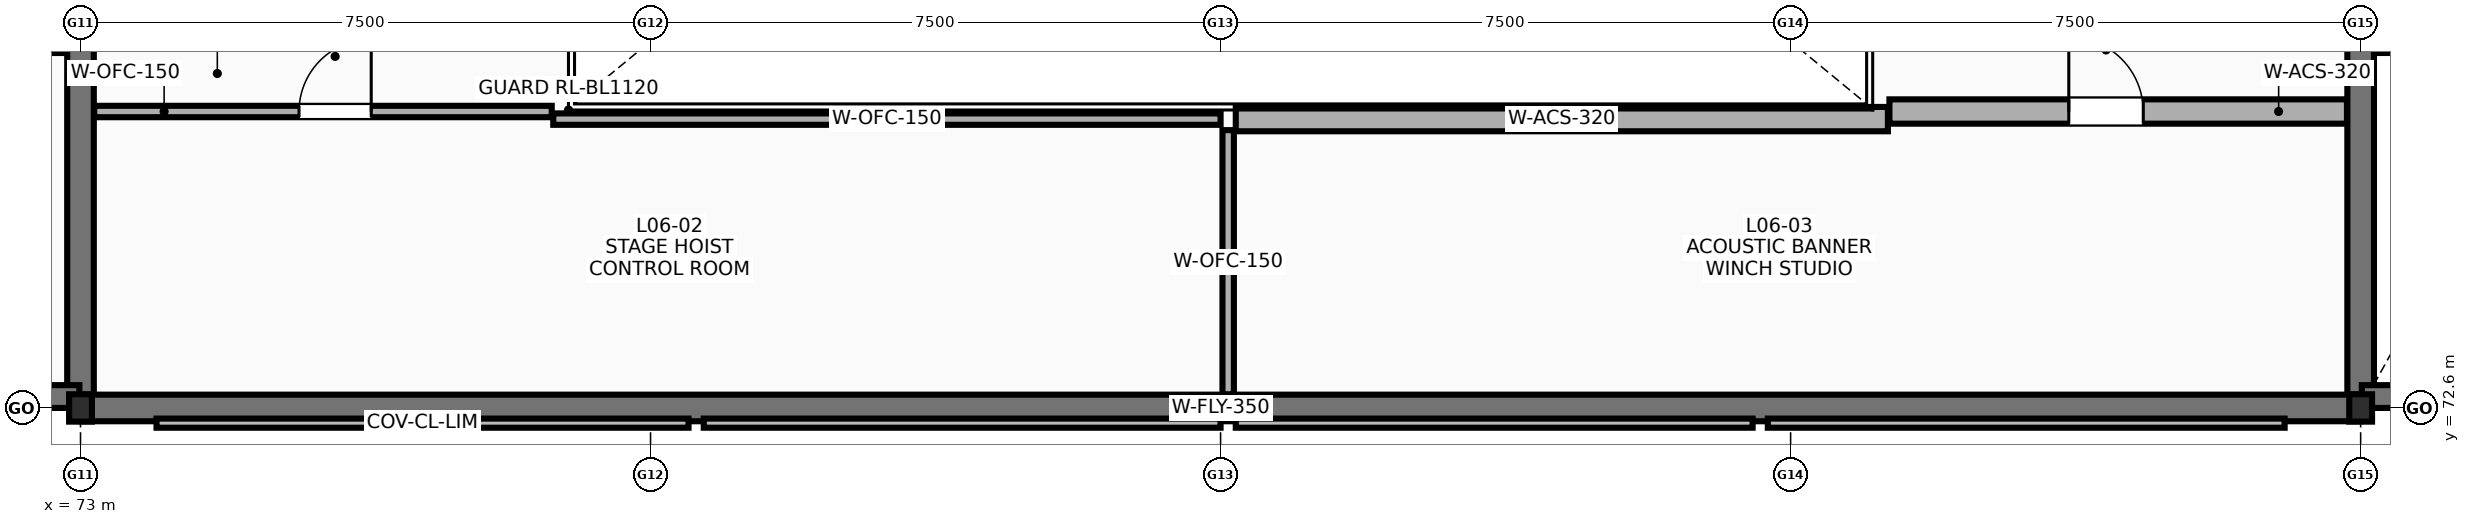
"""IFC4 building model, lengths in metres.
Left out: names, types, materials, properties, quantities, classifications, styles, units other than length and angle.
Written with IfcOpenShell. Run it as: python <this file> out.ifc"""

import sys

from ifc_helpers import new_model, si_unit, direction, frame, frame_2d, origin, origin_2d, place, context, subcontext, project, spatial, rectangle, i_section, extrude, element, fill, save


model = new_model("IFC4")
c1 = context("Model", 3, precision=1e-05, world=origin(), true_north=direction((0.0, 1.0)))
c2 = subcontext(c1, "Body", "Model", "MODEL_VIEW")
j1 = project(units=[si_unit("LENGTHUNIT", "METRE"), si_unit("PLANEANGLEUNIT", "RADIAN")], contexts=[c1])
p1 = place(None, origin())
s1 = spatial("IfcSite", under=j1, at=p1, CompositionType="ELEMENT")
p2 = place(p1, origin())
s2 = spatial("IfcBuilding", under=s1, at=p2, CompositionType="ELEMENT")
p3 = place(p2, frame((0.0, 0.0, 28.2)))
s3 = spatial("IfcBuildingStorey", under=s2, at=p3, CompositionType="ELEMENT", Elevation=28.2)
for number, where, z_axis, x_axis in (
    (1, (73.0, 72.6, 0.0), (0.0, 0.0, 1.0), (1.0, 0.0, 0.0)),
    (2, (103.0, 72.6, 0.0), (0.0, 0.0, 1.0), (1.0, 0.0, 0.0)),
):
    element("IfcColumn", number, at=place(p3, frame(where, z_axis=z_axis, x_axis=x_axis)), inside=s3, PredefinedType="COLUMN", context=c2, shape_type="SweptSolid", body=[
        extrude(i_section(OverallWidth=0.3, OverallDepth=0.36, WebThickness=0.012, FlangeThickness=0.022, FilletRadius=0.027, at=origin_2d()), origin(), (0.0, 0.0, 1.0), 2.8),
    ])
p4 = place(p3, frame((73.0, 72.77, 0.0), z_axis=(0.0, 0.0, 1.0), x_axis=(0.0, 1.0, 0.0)))
e3 = element("IfcWall", 3, at=p4, inside=s3, PredefinedType="SHEAR", context=c2, shape_type="SweptSolid", body=[
    extrude(rectangle(XDim=25.66, YDim=0.35, at=frame_2d((12.83, 0.0))), origin(), (0.0, 0.0, 1.0), 2.8),
])
p5 = place(p4, frame((11.33, 0.0, 0.0), z_axis=(0.0, 0.0, 1.0), x_axis=(-1.0, 0.0, 0.0)))
e4 = element("IfcOpeningElement", 4, at=p5, cuts=e3, PredefinedType="OPENING", context=c2, shape_type="SweptSolid", body=[
    extrude(rectangle(XDim=1.2, YDim=2.15, at=frame_2d((0.6, 1.075))), frame((0.0, 0.185, 0.0), z_axis=(0.0, -1.0, 0.0), x_axis=(1.0, 0.0, 0.0)), (0.0, 0.0, 1.0), 0.37),
])
p6 = place(p3, frame((103.0, 72.77, 0.0), z_axis=(0.0, 0.0, 1.0), x_axis=(0.0, 1.0, 0.0)))
e5 = element("IfcWall", 5, at=p6, inside=s3, PredefinedType="SHEAR", context=c2, shape_type="SweptSolid", body=[
    extrude(rectangle(XDim=25.66, YDim=0.35, at=frame_2d((12.83, 0.0))), origin(), (0.0, 0.0, 1.0), 2.8),
])
p7 = place(p6, frame((10.13, 0.0, 0.0)))
e6 = element("IfcOpeningElement", 6, at=p7, cuts=e5, PredefinedType="OPENING", context=c2, shape_type="SweptSolid", body=[
    extrude(rectangle(XDim=1.2, YDim=2.15, at=frame_2d((0.6, 1.075))), frame((0.0, 0.185, 0.0), z_axis=(0.0, -1.0, 0.0), x_axis=(1.0, 0.0, 0.0)), (0.0, 0.0, 1.0), 0.37),
])
p8 = place(p3, frame((73.005, 72.6, 0.0), z_axis=(0.0, 0.0, 1.0), x_axis=(1.0, 0.0, 0.0)))
e7 = element("IfcWall", 7, at=p8, inside=s3, PredefinedType="SHEAR", context=c2, shape_type="SweptSolid", body=[
    extrude(rectangle(XDim=29.99, YDim=0.35, at=frame_2d((14.995, 0.0))), origin(), (0.0, 0.0, 1.0), 2.8),
])
for number, where, z_axis, x_axis in (
    (8, (69.7, 77.38, 0.0), (0.0, 0.0, 1.0), (1.0, 0.0, 0.0)),
    (9, (103.18, 77.38, 0.0), (0.0, 0.0, 1.0), (1.0, 0.0, 0.0)),
):
    element("IfcWall", number, at=place(p3, frame(where, z_axis=z_axis, x_axis=x_axis)), inside=s3, PredefinedType="SOLIDWALL", context=c2, shape_type="SweptSolid", body=[
        extrude(rectangle(XDim=3.12, YDim=0.22, at=frame_2d((1.56, 0.0))), origin(), (0.0, 0.0, 1.0), 2.8),
    ])
p9 = place(p3, frame((88.1, 72.78, 0.0), z_axis=(0.0, 0.0, 1.0), x_axis=(0.0, 1.0, 0.0)))
e10 = element("IfcWall", 10, at=p9, inside=s3, PredefinedType="PARTITIONING", context=c2, shape_type="SweptSolid", body=[
    extrude(rectangle(XDim=3.475, YDim=0.15, at=frame_2d((1.737, 0.0))), origin(), (0.0, 0.0, 1.0), 2.5),
])
p10 = place(p3, frame((73.18, 76.5, 0.0), z_axis=(0.0, 0.0, 1.0), x_axis=(1.0, 0.0, 0.0)))
e11 = element("IfcWall", 11, at=p10, inside=s3, PredefinedType="PARTITIONING", context=c2, shape_type="SweptSolid", body=[
    extrude(rectangle(XDim=6.02, YDim=0.15, at=frame_2d((3.01, 0.0))), origin(), (0.0, 0.0, 1.0), 2.5),
])
p11 = place(p10, frame((2.695, 0.0, 0.0)))
e12 = element("IfcOpeningElement", 12, at=p11, cuts=e11, PredefinedType="OPENING", context=c2, shape_type="SweptSolid", body=[
    extrude(rectangle(XDim=0.95, YDim=2.15, at=frame_2d((0.475, 1.075))), frame((0.0, 0.085, 0.0), z_axis=(0.0, -1.0, 0.0), x_axis=(1.0, 0.0, 0.0)), (0.0, 0.0, 1.0), 0.17),
])
p12 = place(p3, frame((96.8, 76.5, 0.0), z_axis=(0.0, 0.0, 1.0), x_axis=(1.0, 0.0, 0.0)))
e13 = element("IfcWall", 13, at=p12, inside=s3, PredefinedType="PARTITIONING", context=c2, shape_type="SweptSolid", body=[
    extrude(rectangle(XDim=6.02, YDim=0.32, at=frame_2d((3.01, 0.0))), origin(), (0.0, 0.0, 1.0), 2.5),
])
p13 = place(p12, frame((2.36, 0.0, 0.0)))
e14 = element("IfcOpeningElement", 14, at=p13, cuts=e13, PredefinedType="OPENING", context=c2, shape_type="SweptSolid", body=[
    extrude(rectangle(XDim=0.98, YDim=2.15, at=frame_2d((0.49, 1.075))), frame((0.0, 0.17, 0.0), z_axis=(0.0, -1.0, 0.0), x_axis=(1.0, 0.0, 0.0)), (0.0, 0.0, 1.0), 0.34),
])
for number, where, z_axis, x_axis in (
    (15, (65.5, 72.75, 0.0), (0.0, 0.0, 1.0), (1.0, 0.0, 0.0)),
    (16, (103.015, 72.75, 0.0), (0.0, 0.0, 1.0), (1.0, 0.0, 0.0)),
):
    element("IfcWall", number, at=place(p3, frame(where, z_axis=z_axis, x_axis=x_axis)), inside=s3, PredefinedType="SHEAR", context=c2, shape_type="SweptSolid", body=[
        extrude(rectangle(XDim=7.485, YDim=0.3, at=frame_2d((3.743, 0.0))), origin(), (0.0, 0.0, 1.0), 2.8),
    ])
p14 = place(p3, frame((79.22, 76.4, 0.0), z_axis=(0.0, 0.0, 1.0), x_axis=(1.0, 0.0, 0.0)))
e17 = element("IfcWall", 17, at=p14, inside=s3, PredefinedType="PARTITIONING", context=c2, shape_type="SweptSolid", body=[
    extrude(rectangle(XDim=8.78, YDim=0.15, at=frame_2d((4.39, 0.0))), origin(), (0.0, 0.0, 1.0), 2.5),
])
p15 = place(p3, frame((88.2, 76.4, 0.0), z_axis=(0.0, 0.0, 1.0), x_axis=(1.0, 0.0, 0.0)))
e18 = element("IfcWall", 18, at=p15, inside=s3, PredefinedType="PARTITIONING", context=c2, shape_type="SweptSolid", body=[
    extrude(rectangle(XDim=8.58, YDim=0.32, at=frame_2d((4.29, 0.0))), origin(), (0.0, 0.0, 1.0), 2.5),
])
p16 = place(p11, origin())
e19 = element("IfcDoor", 19, at=p16, inside=s3, OperationType="SINGLE_SWING_RIGHT", PredefinedType="DOOR", context=c2, shape_type="SweptSolid", body=[
    extrude(rectangle(XDim=0.95, YDim=2.15, at=frame_2d((0.475, 1.075))), frame((0.0, 0.025, 0.0), z_axis=(0.0, -1.0, 0.0), x_axis=(1.0, 0.0, 0.0)), (0.0, 0.0, 1.0), 0.05),
])
fill(e12, e19)
p17 = place(p13, origin())
e20 = element("IfcDoor", 20, at=p17, inside=s3, OperationType="SINGLE_SWING_LEFT", PredefinedType="DOOR", context=c2, shape_type="SweptSolid", body=[
    extrude(rectangle(XDim=0.98, YDim=2.15, at=frame_2d((0.49, 1.075))), frame((0.0, 0.025, 0.0), z_axis=(0.0, -1.0, 0.0), x_axis=(1.0, 0.0, 0.0)), (0.0, 0.0, 1.0), 0.05),
])
fill(e14, e20)
save(model, sys.argv[1])
